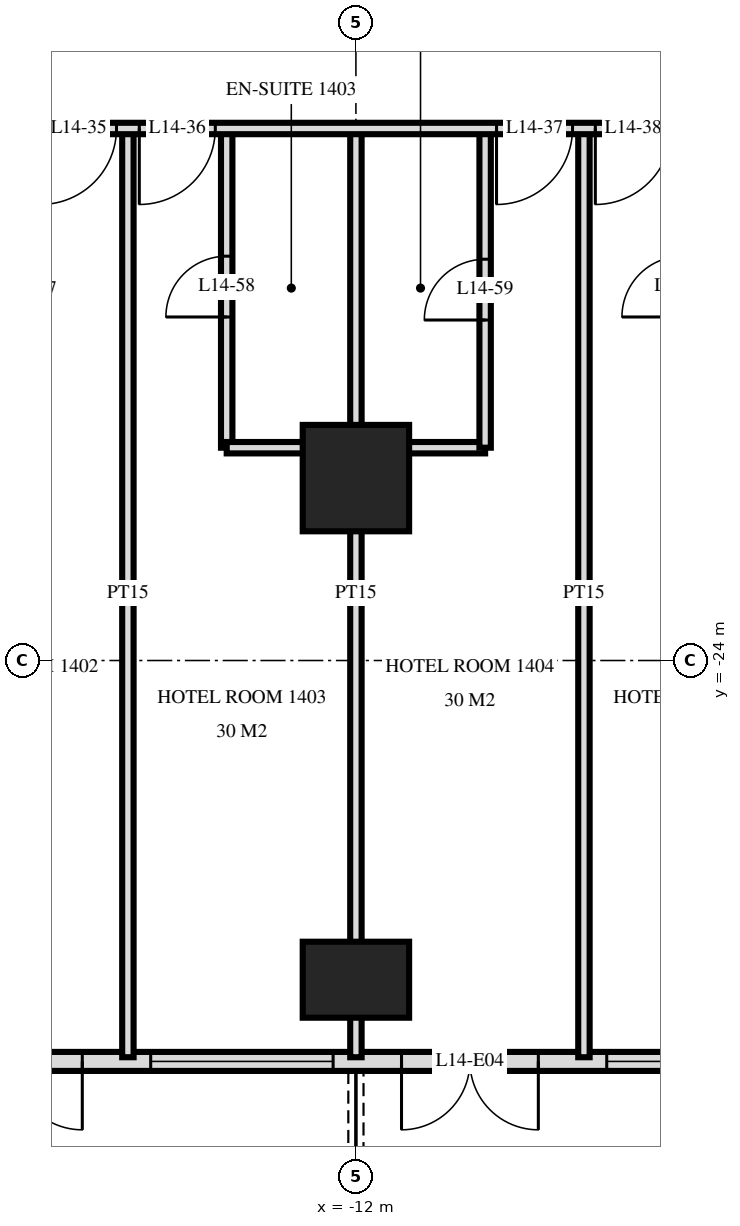
"""IFC4 building model, lengths in metres.
Left out: names, types, materials, properties, quantities, classifications, styles, units other than length and angle.
Written with IfcOpenShell. Run it as: python <this file> out.ifc"""

import sys

from ifc_helpers import new_model, si_unit, direction, frame, frame_2d, origin, origin_2d, place, context, subcontext, project, spatial, rectangle, extrude, element, fill, save


model = new_model("IFC4")
c1 = context("Model", 3, precision=1e-05, world=origin(), true_north=direction((0.0, 1.0)))
c2 = subcontext(c1, "Body", "Model", "MODEL_VIEW")
j1 = project(units=[si_unit("LENGTHUNIT", "METRE"), si_unit("PLANEANGLEUNIT", "RADIAN")], contexts=[c1])
p1 = place(None, origin())
s1 = spatial("IfcSite", under=j1, at=p1, CompositionType="ELEMENT")
p2 = place(p1, origin())
s2 = spatial("IfcBuilding", under=s1, at=p2, CompositionType="ELEMENT")
p3 = place(p2, frame((0.0, 0.0, 60.0)))
s3 = spatial("IfcBuildingStorey", under=s2, at=p3, CompositionType="ELEMENT", Elevation=60.0)
p4 = place(p3, frame((-12.0, -28.2, 0.0), z_axis=(0.0, 0.0, 1.0), x_axis=(1.0, 0.0, 0.0)))
e1 = element("IfcColumn", 1, at=p4, inside=s3, PredefinedType="COLUMN", context=c2, shape_type="SweptSolid", body=[
    extrude(rectangle(XDim=1.4, YDim=1.0, at=origin_2d()), origin(), (0.0, 0.0, 1.0), 3.6),
])
p5 = place(p3, frame((-12.0, -21.6, 0.0), z_axis=(0.0, 0.0, 1.0), x_axis=(1.0, 0.0, 0.0)))
e2 = element("IfcColumn", 2, at=p5, inside=s3, PredefinedType="COLUMN", context=c2, shape_type="SweptSolid", body=[
    extrude(rectangle(XDim=1.4, YDim=1.4, at=origin_2d()), origin(), (0.0, 0.0, 1.0), 3.6),
])
p6 = place(p3, frame((-28.775, -29.275, 0.0), z_axis=(0.0, 0.0, 1.0), x_axis=(1.0, 0.0, 0.0)))
e3 = element("IfcWall", 3, at=p6, inside=s3, PredefinedType="SOLIDWALL", context=c2, shape_type="SweptSolid", body=[
    extrude(rectangle(XDim=57.551, YDim=0.25, at=frame_2d((28.775, 0.0))), origin(), (0.0, 0.0, 1.0), 3.32),
])
p7 = place(p6, frame((0.575, 0.0, 0.0)))
e4 = element("IfcOpeningElement", 4, at=p7, cuts=e3, PredefinedType="OPENING", context=c2, shape_type="SweptSolid", body=[
    extrude(rectangle(XDim=1.8, YDim=2.4, at=frame_2d((0.9, 1.2))), frame((0.0, 0.135, 0.0), z_axis=(0.0, -1.0, 0.0), x_axis=(1.0, 0.0, 0.0)), (0.0, 0.0, 1.0), 0.27),
])
p8 = place(p6, frame((5.375, 0.0, 0.0)))
e5 = element("IfcOpeningElement", 5, at=p8, cuts=e3, PredefinedType="OPENING", context=c2, shape_type="SweptSolid", body=[
    extrude(rectangle(XDim=1.8, YDim=2.4, at=frame_2d((0.9, 1.2))), frame((0.0, 0.135, 0.0), z_axis=(0.0, -1.0, 0.0), x_axis=(1.0, 0.0, 0.0)), (0.0, 0.0, 1.0), 0.27),
])
p9 = place(p6, frame((8.075, 0.0, 0.3)))
e6 = element("IfcOpeningElement", 6, at=p9, cuts=e3, PredefinedType="OPENING", context=c2, shape_type="SweptSolid", body=[
    extrude(rectangle(XDim=2.4, YDim=2.1, at=frame_2d((1.2, 1.05))), frame((0.0, 0.135, 0.0), z_axis=(0.0, -1.0, 0.0), x_axis=(1.0, 0.0, 0.0)), (0.0, 0.0, 1.0), 0.27),
])
p10 = place(p6, frame((11.375, 0.0, 0.0)))
e7 = element("IfcOpeningElement", 7, at=p10, cuts=e3, PredefinedType="OPENING", context=c2, shape_type="SweptSolid", body=[
    extrude(rectangle(XDim=1.8, YDim=2.4, at=frame_2d((0.9, 1.2))), frame((0.0, 0.135, 0.0), z_axis=(0.0, -1.0, 0.0), x_axis=(1.0, 0.0, 0.0)), (0.0, 0.0, 1.0), 0.27),
])
p11 = place(p6, frame((14.075, 0.0, 0.3)))
e8 = element("IfcOpeningElement", 8, at=p11, cuts=e3, PredefinedType="OPENING", context=c2, shape_type="SweptSolid", body=[
    extrude(rectangle(XDim=2.4, YDim=2.1, at=frame_2d((1.2, 1.05))), frame((0.0, 0.135, 0.0), z_axis=(0.0, -1.0, 0.0), x_axis=(1.0, 0.0, 0.0)), (0.0, 0.0, 1.0), 0.27),
])
p12 = place(p6, frame((17.375, 0.0, 0.0)))
e9 = element("IfcOpeningElement", 9, at=p12, cuts=e3, PredefinedType="OPENING", context=c2, shape_type="SweptSolid", body=[
    extrude(rectangle(XDim=1.8, YDim=2.4, at=frame_2d((0.9, 1.2))), frame((0.0, 0.135, 0.0), z_axis=(0.0, -1.0, 0.0), x_axis=(1.0, 0.0, 0.0)), (0.0, 0.0, 1.0), 0.27),
])
p13 = place(p6, frame((20.075, 0.0, 0.3)))
e10 = element("IfcOpeningElement", 10, at=p13, cuts=e3, PredefinedType="OPENING", context=c2, shape_type="SweptSolid", body=[
    extrude(rectangle(XDim=2.4, YDim=2.1, at=frame_2d((1.2, 1.05))), frame((0.0, 0.135, 0.0), z_axis=(0.0, -1.0, 0.0), x_axis=(1.0, 0.0, 0.0)), (0.0, 0.0, 1.0), 0.27),
])
p14 = place(p6, frame((23.075, 0.0, 0.3)))
e11 = element("IfcOpeningElement", 11, at=p14, cuts=e3, PredefinedType="OPENING", context=c2, shape_type="SweptSolid", body=[
    extrude(rectangle(XDim=2.4, YDim=2.1, at=frame_2d((1.2, 1.05))), frame((0.0, 0.135, 0.0), z_axis=(0.0, -1.0, 0.0), x_axis=(1.0, 0.0, 0.0)), (0.0, 0.0, 1.0), 0.27),
])
p15 = place(p6, frame((26.375, 0.0, 0.0)))
e12 = element("IfcOpeningElement", 12, at=p15, cuts=e3, PredefinedType="OPENING", context=c2, shape_type="SweptSolid", body=[
    extrude(rectangle(XDim=1.8, YDim=2.4, at=frame_2d((0.9, 1.2))), frame((0.0, 0.135, 0.0), z_axis=(0.0, -1.0, 0.0), x_axis=(1.0, 0.0, 0.0)), (0.0, 0.0, 1.0), 0.27),
])
p16 = place(p6, frame((29.075, 0.0, 0.3)))
e13 = element("IfcOpeningElement", 13, at=p16, cuts=e3, PredefinedType="OPENING", context=c2, shape_type="SweptSolid", body=[
    extrude(rectangle(XDim=2.4, YDim=2.1, at=frame_2d((1.2, 1.05))), frame((0.0, 0.135, 0.0), z_axis=(0.0, -1.0, 0.0), x_axis=(1.0, 0.0, 0.0)), (0.0, 0.0, 1.0), 0.27),
])
p17 = place(p6, frame((32.375, 0.0, 0.0)))
e14 = element("IfcOpeningElement", 14, at=p17, cuts=e3, PredefinedType="OPENING", context=c2, shape_type="SweptSolid", body=[
    extrude(rectangle(XDim=1.8, YDim=2.4, at=frame_2d((0.9, 1.2))), frame((0.0, 0.135, 0.0), z_axis=(0.0, -1.0, 0.0), x_axis=(1.0, 0.0, 0.0)), (0.0, 0.0, 1.0), 0.27),
])
p18 = place(p6, frame((35.375, 0.0, 0.0)))
e15 = element("IfcOpeningElement", 15, at=p18, cuts=e3, PredefinedType="OPENING", context=c2, shape_type="SweptSolid", body=[
    extrude(rectangle(XDim=1.8, YDim=2.4, at=frame_2d((0.9, 1.2))), frame((0.0, 0.135, 0.0), z_axis=(0.0, -1.0, 0.0), x_axis=(1.0, 0.0, 0.0)), (0.0, 0.0, 1.0), 0.27),
])
p19 = place(p6, frame((38.075, 0.0, 0.3)))
e16 = element("IfcOpeningElement", 16, at=p19, cuts=e3, PredefinedType="OPENING", context=c2, shape_type="SweptSolid", body=[
    extrude(rectangle(XDim=2.4, YDim=2.1, at=frame_2d((1.2, 1.05))), frame((0.0, 0.135, 0.0), z_axis=(0.0, -1.0, 0.0), x_axis=(1.0, 0.0, 0.0)), (0.0, 0.0, 1.0), 0.27),
])
p20 = place(p6, frame((41.375, 0.0, 0.0)))
e17 = element("IfcOpeningElement", 17, at=p20, cuts=e3, PredefinedType="OPENING", context=c2, shape_type="SweptSolid", body=[
    extrude(rectangle(XDim=1.8, YDim=2.4, at=frame_2d((0.9, 1.2))), frame((0.0, 0.135, 0.0), z_axis=(0.0, -1.0, 0.0), x_axis=(1.0, 0.0, 0.0)), (0.0, 0.0, 1.0), 0.27),
])
p21 = place(p6, frame((44.075, 0.0, 0.3)))
e18 = element("IfcOpeningElement", 18, at=p21, cuts=e3, PredefinedType="OPENING", context=c2, shape_type="SweptSolid", body=[
    extrude(rectangle(XDim=2.4, YDim=2.1, at=frame_2d((1.2, 1.05))), frame((0.0, 0.135, 0.0), z_axis=(0.0, -1.0, 0.0), x_axis=(1.0, 0.0, 0.0)), (0.0, 0.0, 1.0), 0.27),
])
p22 = place(p6, frame((47.075, 0.0, 0.3)))
e19 = element("IfcOpeningElement", 19, at=p22, cuts=e3, PredefinedType="OPENING", context=c2, shape_type="SweptSolid", body=[
    extrude(rectangle(XDim=2.4, YDim=2.1, at=frame_2d((1.2, 1.05))), frame((0.0, 0.135, 0.0), z_axis=(0.0, -1.0, 0.0), x_axis=(1.0, 0.0, 0.0)), (0.0, 0.0, 1.0), 0.27),
])
p23 = place(p6, frame((50.375, 0.0, 0.0)))
e20 = element("IfcOpeningElement", 20, at=p23, cuts=e3, PredefinedType="OPENING", context=c2, shape_type="SweptSolid", body=[
    extrude(rectangle(XDim=1.8, YDim=2.4, at=frame_2d((0.9, 1.2))), frame((0.0, 0.135, 0.0), z_axis=(0.0, -1.0, 0.0), x_axis=(1.0, 0.0, 0.0)), (0.0, 0.0, 1.0), 0.27),
])
p24 = place(p6, frame((53.375, 0.0, 0.0)))
e21 = element("IfcOpeningElement", 21, at=p24, cuts=e3, PredefinedType="OPENING", context=c2, shape_type="SweptSolid", body=[
    extrude(rectangle(XDim=1.8, YDim=2.4, at=frame_2d((0.9, 1.2))), frame((0.0, 0.135, 0.0), z_axis=(0.0, -1.0, 0.0), x_axis=(1.0, 0.0, 0.0)), (0.0, 0.0, 1.0), 0.27),
])
p25 = place(p3, frame((-9.0, -29.22, 0.0), z_axis=(0.0, 0.0, 1.0), x_axis=(0.0, 1.0, 0.0)))
e22 = element("IfcWall", 22, at=p25, inside=s3, PredefinedType="PARTITIONING", context=c2, shape_type="SweptSolid", body=[
    extrude(rectangle(XDim=12.22, YDim=0.15, at=frame_2d((6.11, 0.0))), origin(), (0.0, 0.0, 1.0), 3.32),
])
p26 = place(p3, frame((-10.3, -21.2, 0.0), z_axis=(0.0, 0.0, 1.0), x_axis=(0.0, 1.0, 0.0)))
e23 = element("IfcWall", 23, at=p26, inside=s3, PredefinedType="PARTITIONING", context=c2, shape_type="SweptSolid", body=[
    extrude(rectangle(XDim=4.2, YDim=0.15, at=frame_2d((2.1, 0.0))), origin(), (0.0, 0.0, 1.0), 3.32),
])
p27 = place(p26, frame((1.68, 0.0, 0.0)))
e24 = element("IfcOpeningElement", 24, at=p27, cuts=e23, PredefinedType="OPENING", context=c2, shape_type="SweptSolid", body=[
    extrude(rectangle(XDim=0.8, YDim=2.1, at=frame_2d((0.4, 1.05))), frame((0.0, 0.085, 0.0), z_axis=(0.0, -1.0, 0.0), x_axis=(1.0, 0.0, 0.0)), (0.0, 0.0, 1.0), 0.17),
])
p28 = place(p3, frame((-12.0, -29.22, 0.0), z_axis=(0.0, 0.0, 1.0), x_axis=(0.0, 1.0, 0.0)))
e25 = element("IfcWall", 25, at=p28, inside=s3, PredefinedType="PARTITIONING", context=c2, shape_type="SweptSolid", body=[
    extrude(rectangle(XDim=12.22, YDim=0.15, at=frame_2d((6.11, 0.0))), origin(), (0.0, 0.0, 1.0), 3.32),
])
p29 = place(p3, frame((-13.7, -21.2, 0.0), z_axis=(0.0, 0.0, 1.0), x_axis=(0.0, 1.0, 0.0)))
e26 = element("IfcWall", 26, at=p29, inside=s3, PredefinedType="PARTITIONING", context=c2, shape_type="SweptSolid", body=[
    extrude(rectangle(XDim=4.2, YDim=0.15, at=frame_2d((2.1, 0.0))), origin(), (0.0, 0.0, 1.0), 3.32),
])
p30 = place(p29, frame((1.72, 0.0, 0.0)))
e27 = element("IfcOpeningElement", 27, at=p30, cuts=e26, PredefinedType="OPENING", context=c2, shape_type="SweptSolid", body=[
    extrude(rectangle(XDim=0.8, YDim=2.1, at=frame_2d((0.4, 1.05))), frame((0.0, 0.085, 0.0), z_axis=(0.0, -1.0, 0.0), x_axis=(1.0, 0.0, 0.0)), (0.0, 0.0, 1.0), 0.17),
])
p31 = place(p3, frame((-15.0, -29.22, 0.0), z_axis=(0.0, 0.0, 1.0), x_axis=(0.0, 1.0, 0.0)))
e28 = element("IfcWall", 28, at=p31, inside=s3, PredefinedType="PARTITIONING", context=c2, shape_type="SweptSolid", body=[
    extrude(rectangle(XDim=12.22, YDim=0.15, at=frame_2d((6.11, 0.0))), origin(), (0.0, 0.0, 1.0), 3.32),
])
p32 = place(p3, frame((-13.7, -21.2, 0.0), z_axis=(0.0, 0.0, 1.0), x_axis=(1.0, 0.0, 0.0)))
e29 = element("IfcWall", 29, at=p32, inside=s3, PredefinedType="PARTITIONING", context=c2, shape_type="SweptSolid", body=[
    extrude(rectangle(XDim=3.4, YDim=0.15, at=frame_2d((1.7, 0.0))), origin(), (0.0, 0.0, 1.0), 3.32),
])
p33 = place(p3, frame((-33.12, -17.0, 0.0), z_axis=(0.0, 0.0, 1.0), x_axis=(1.0, 0.0, 0.0)))
e30 = element("IfcWall", 30, at=p33, inside=s3, PredefinedType="PARTITIONING", context=c2, shape_type="SweptSolid", body=[
    extrude(rectangle(XDim=66.24, YDim=0.15, at=frame_2d((33.12, 0.0))), origin(), (0.0, 0.0, 1.0), 3.32),
])
p34 = place(p33, frame((12.27, 0.0, 0.0)))
e31 = element("IfcOpeningElement", 31, at=p34, cuts=e30, PredefinedType="OPENING", context=c2, shape_type="SweptSolid", body=[
    extrude(rectangle(XDim=1.0, YDim=2.1, at=frame_2d((0.5, 1.05))), frame((0.0, 0.085, 0.0), z_axis=(0.0, -1.0, 0.0), x_axis=(1.0, 0.0, 0.0)), (0.0, 0.0, 1.0), 0.17),
])
p35 = place(p33, frame((16.97, 0.0, 0.0)))
e32 = element("IfcOpeningElement", 32, at=p35, cuts=e30, PredefinedType="OPENING", context=c2, shape_type="SweptSolid", body=[
    extrude(rectangle(XDim=1.0, YDim=2.1, at=frame_2d((0.5, 1.05))), frame((0.0, 0.085, 0.0), z_axis=(0.0, -1.0, 0.0), x_axis=(1.0, 0.0, 0.0)), (0.0, 0.0, 1.0), 0.17),
])
p36 = place(p33, frame((18.27, 0.0, 0.0)))
e33 = element("IfcOpeningElement", 33, at=p36, cuts=e30, PredefinedType="OPENING", context=c2, shape_type="SweptSolid", body=[
    extrude(rectangle(XDim=1.0, YDim=2.1, at=frame_2d((0.5, 1.05))), frame((0.0, 0.085, 0.0), z_axis=(0.0, -1.0, 0.0), x_axis=(1.0, 0.0, 0.0)), (0.0, 0.0, 1.0), 0.17),
])
p37 = place(p33, frame((22.97, 0.0, 0.0)))
e34 = element("IfcOpeningElement", 34, at=p37, cuts=e30, PredefinedType="OPENING", context=c2, shape_type="SweptSolid", body=[
    extrude(rectangle(XDim=1.0, YDim=2.1, at=frame_2d((0.5, 1.05))), frame((0.0, 0.085, 0.0), z_axis=(0.0, -1.0, 0.0), x_axis=(1.0, 0.0, 0.0)), (0.0, 0.0, 1.0), 0.17),
])
p38 = place(p33, frame((24.27, 0.0, 0.0)))
e35 = element("IfcOpeningElement", 35, at=p38, cuts=e30, PredefinedType="OPENING", context=c2, shape_type="SweptSolid", body=[
    extrude(rectangle(XDim=1.0, YDim=2.1, at=frame_2d((0.5, 1.05))), frame((0.0, 0.085, 0.0), z_axis=(0.0, -1.0, 0.0), x_axis=(1.0, 0.0, 0.0)), (0.0, 0.0, 1.0), 0.17),
])
p39 = place(p33, frame((28.97, 0.0, 0.0)))
e36 = element("IfcOpeningElement", 36, at=p39, cuts=e30, PredefinedType="OPENING", context=c2, shape_type="SweptSolid", body=[
    extrude(rectangle(XDim=1.0, YDim=2.1, at=frame_2d((0.5, 1.05))), frame((0.0, 0.085, 0.0), z_axis=(0.0, -1.0, 0.0), x_axis=(1.0, 0.0, 0.0)), (0.0, 0.0, 1.0), 0.17),
])
p40 = place(p33, frame((30.27, 0.0, 0.0)))
e37 = element("IfcOpeningElement", 37, at=p40, cuts=e30, PredefinedType="OPENING", context=c2, shape_type="SweptSolid", body=[
    extrude(rectangle(XDim=1.0, YDim=2.1, at=frame_2d((0.5, 1.05))), frame((0.0, 0.085, 0.0), z_axis=(0.0, -1.0, 0.0), x_axis=(1.0, 0.0, 0.0)), (0.0, 0.0, 1.0), 0.17),
])
p41 = place(p33, frame((33.82, 0.0, 0.0)))
e38 = element("IfcOpeningElement", 38, at=p41, cuts=e30, PredefinedType="OPENING", context=c2, shape_type="SweptSolid", body=[
    extrude(rectangle(XDim=1.0, YDim=2.1, at=frame_2d((0.5, 1.05))), frame((0.0, 0.085, 0.0), z_axis=(0.0, -1.0, 0.0), x_axis=(1.0, 0.0, 0.0)), (0.0, 0.0, 1.0), 0.17),
])
p42 = place(p33, frame((46.27, 0.0, 0.0)))
e39 = element("IfcOpeningElement", 39, at=p42, cuts=e30, PredefinedType="OPENING", context=c2, shape_type="SweptSolid", body=[
    extrude(rectangle(XDim=1.0, YDim=2.1, at=frame_2d((0.5, 1.05))), frame((0.0, 0.085, 0.0), z_axis=(0.0, -1.0, 0.0), x_axis=(1.0, 0.0, 0.0)), (0.0, 0.0, 1.0), 0.17),
])
p43 = place(p33, frame((52.97, 0.0, 0.0)))
e40 = element("IfcOpeningElement", 40, at=p43, cuts=e30, PredefinedType="OPENING", context=c2, shape_type="SweptSolid", body=[
    extrude(rectangle(XDim=1.0, YDim=2.1, at=frame_2d((0.5, 1.05))), frame((0.0, 0.085, 0.0), z_axis=(0.0, -1.0, 0.0), x_axis=(1.0, 0.0, 0.0)), (0.0, 0.0, 1.0), 0.17),
])
p44 = place(p33, frame((6.05, 0.0, 0.0)))
e41 = element("IfcOpeningElement", 41, at=p44, cuts=e30, PredefinedType="OPENING", context=c2, shape_type="SweptSolid", body=[
    extrude(rectangle(XDim=1.0, YDim=2.1, at=frame_2d((0.5, 1.05))), frame((0.0, 0.085, 0.0), z_axis=(0.0, -1.0, 0.0), x_axis=(1.0, 0.0, 0.0)), (0.0, 0.0, 1.0), 0.17),
])
p45 = place(p33, frame((59.15, 0.0, 0.0)))
e42 = element("IfcOpeningElement", 42, at=p45, cuts=e30, PredefinedType="OPENING", context=c2, shape_type="SweptSolid", body=[
    extrude(rectangle(XDim=1.0, YDim=2.1, at=frame_2d((0.5, 1.05))), frame((0.0, 0.085, 0.0), z_axis=(0.0, -1.0, 0.0), x_axis=(1.0, 0.0, 0.0)), (0.0, 0.0, 1.0), 0.17),
])
p46 = place(p10, frame((0.9, 0.0, 0.0), z_axis=(0.0, 0.0, 1.0), x_axis=(-1.0, 0.0, 0.0)))
e43 = element("IfcDoor", 43, at=p46, inside=s3, OperationType="DOUBLE_DOOR_SINGLE_SWING", PredefinedType="DOOR", context=c2, shape_type="SweptSolid", body=[
    extrude(rectangle(XDim=1.8, YDim=2.4, at=frame_2d((0.0, 1.2))), frame((0.0, -0.025, 0.0), z_axis=(0.0, 1.0, 0.0), x_axis=(-1.0, 0.0, 0.0)), (0.0, 0.0, 1.0), 0.05),
])
fill(e7, e43)
p47 = place(p11, origin())
e44 = element("IfcWindow", 44, at=p47, inside=s3, PartitioningType="SINGLE_PANEL", PredefinedType="WINDOW", context=c2, shape_type="SweptSolid", body=[
    extrude(rectangle(XDim=2.4, YDim=2.1, at=frame_2d((1.2, 1.05))), frame((0.0, 0.03, 0.0), z_axis=(0.0, -1.0, 0.0), x_axis=(1.0, 0.0, 0.0)), (0.0, 0.0, 1.0), 0.06),
])
fill(e8, e44)
p48 = place(p12, frame((0.9, 0.0, 0.0), z_axis=(0.0, 0.0, 1.0), x_axis=(-1.0, 0.0, 0.0)))
e45 = element("IfcDoor", 45, at=p48, inside=s3, OperationType="DOUBLE_DOOR_SINGLE_SWING", PredefinedType="DOOR", context=c2, shape_type="SweptSolid", body=[
    extrude(rectangle(XDim=1.8, YDim=2.4, at=frame_2d((0.0, 1.2))), frame((0.0, -0.025, 0.0), z_axis=(0.0, 1.0, 0.0), x_axis=(-1.0, 0.0, 0.0)), (0.0, 0.0, 1.0), 0.05),
])
fill(e9, e45)
p49 = place(p13, origin())
e46 = element("IfcWindow", 46, at=p49, inside=s3, PartitioningType="SINGLE_PANEL", PredefinedType="WINDOW", context=c2, shape_type="SweptSolid", body=[
    extrude(rectangle(XDim=2.4, YDim=2.1, at=frame_2d((1.2, 1.05))), frame((0.0, 0.03, 0.0), z_axis=(0.0, -1.0, 0.0), x_axis=(1.0, 0.0, 0.0)), (0.0, 0.0, 1.0), 0.06),
])
fill(e10, e46)
p50 = place(p35, frame((0.5, 0.0, 0.0), z_axis=(0.0, 0.0, 1.0), x_axis=(-1.0, 0.0, 0.0)))
e47 = element("IfcDoor", 47, at=p50, inside=s3, OperationType="SINGLE_SWING_LEFT", PredefinedType="DOOR", context=c2, shape_type="SweptSolid", body=[
    extrude(rectangle(XDim=1.0, YDim=2.1, at=frame_2d((0.0, 1.05))), frame((0.0, -0.025, 0.0), z_axis=(0.0, 1.0, 0.0), x_axis=(-1.0, 0.0, 0.0)), (0.0, 0.0, 1.0), 0.05),
])
fill(e32, e47)
p51 = place(p36, frame((0.5, 0.0, 0.0), z_axis=(0.0, 0.0, 1.0), x_axis=(-1.0, 0.0, 0.0)))
e48 = element("IfcDoor", 48, at=p51, inside=s3, OperationType="SINGLE_SWING_LEFT", PredefinedType="DOOR", context=c2, shape_type="SweptSolid", body=[
    extrude(rectangle(XDim=1.0, YDim=2.1, at=frame_2d((0.0, 1.05))), frame((0.0, -0.025, 0.0), z_axis=(0.0, 1.0, 0.0), x_axis=(-1.0, 0.0, 0.0)), (0.0, 0.0, 1.0), 0.05),
])
fill(e33, e48)
p52 = place(p37, frame((0.5, 0.0, 0.0), z_axis=(0.0, 0.0, 1.0), x_axis=(-1.0, 0.0, 0.0)))
e49 = element("IfcDoor", 49, at=p52, inside=s3, OperationType="SINGLE_SWING_LEFT", PredefinedType="DOOR", context=c2, shape_type="SweptSolid", body=[
    extrude(rectangle(XDim=1.0, YDim=2.1, at=frame_2d((0.0, 1.05))), frame((0.0, -0.025, 0.0), z_axis=(0.0, 1.0, 0.0), x_axis=(-1.0, 0.0, 0.0)), (0.0, 0.0, 1.0), 0.05),
])
fill(e34, e49)
p53 = place(p38, frame((0.5, 0.0, 0.0), z_axis=(0.0, 0.0, 1.0), x_axis=(-1.0, 0.0, 0.0)))
e50 = element("IfcDoor", 50, at=p53, inside=s3, OperationType="SINGLE_SWING_LEFT", PredefinedType="DOOR", context=c2, shape_type="SweptSolid", body=[
    extrude(rectangle(XDim=1.0, YDim=2.1, at=frame_2d((0.0, 1.05))), frame((0.0, -0.025, 0.0), z_axis=(0.0, 1.0, 0.0), x_axis=(-1.0, 0.0, 0.0)), (0.0, 0.0, 1.0), 0.05),
])
fill(e35, e50)
p54 = place(p30, origin())
e51 = element("IfcDoor", 51, at=p54, inside=s3, OperationType="SINGLE_SWING_RIGHT", PredefinedType="DOOR", context=c2, shape_type="SweptSolid", body=[
    extrude(rectangle(XDim=0.8, YDim=2.1, at=frame_2d((0.4, 1.05))), frame((0.0, 0.025, 0.0), z_axis=(0.0, -1.0, 0.0), x_axis=(1.0, 0.0, 0.0)), (0.0, 0.0, 1.0), 0.05),
])
fill(e27, e51)
p55 = place(p27, origin())
e52 = element("IfcDoor", 52, at=p55, inside=s3, OperationType="SINGLE_SWING_RIGHT", PredefinedType="DOOR", context=c2, shape_type="SweptSolid", body=[
    extrude(rectangle(XDim=0.8, YDim=2.1, at=frame_2d((0.4, 1.05))), frame((0.0, 0.025, 0.0), z_axis=(0.0, -1.0, 0.0), x_axis=(1.0, 0.0, 0.0)), (0.0, 0.0, 1.0), 0.05),
])
fill(e24, e52)
save(model, sys.argv[1])
